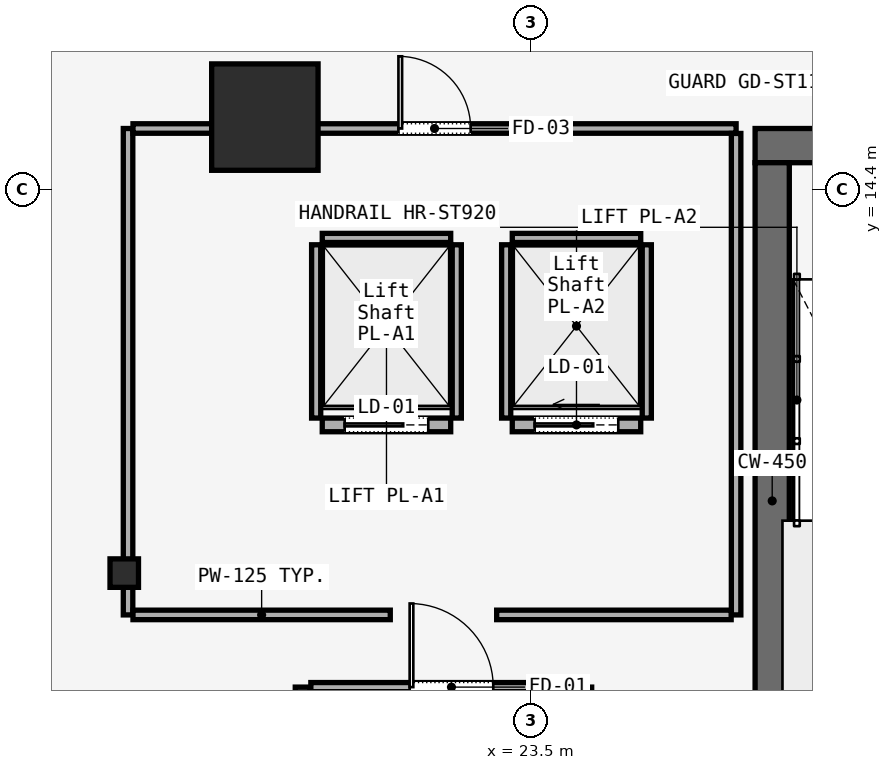
"""IFC4 building model, lengths in metres.
Left out: names, types, materials, properties, quantities, classifications, styles, units other than length and angle.
Written with IfcOpenShell. Run it as: python <this file> out.ifc"""

import sys

from ifc_helpers import new_model, si_unit, direction, frame, frame_2d, origin, origin_2d, place, context, subcontext, project, spatial, rectangle, i_section, extrude, element, fill, save


model = new_model("IFC4")
c1 = context("Model", 3, precision=1e-05, world=origin(), true_north=direction((0.0, 1.0)))
c2 = subcontext(c1, "Body", "Model", "MODEL_VIEW")
j1 = project(units=[si_unit("LENGTHUNIT", "METRE"), si_unit("PLANEANGLEUNIT", "RADIAN")], contexts=[c1])
p1 = place(None, origin())
s1 = spatial("IfcSite", under=j1, at=p1, CompositionType="ELEMENT")
p2 = place(p1, origin())
s2 = spatial("IfcBuilding", under=s1, at=p2, CompositionType="ELEMENT")
p3 = place(p2, frame((0.0, 0.0, -4.5)))
s3 = spatial("IfcBuildingStorey", under=s2, at=p3, CompositionType="ELEMENT", Elevation=-4.5)
p4 = place(p3, frame((26.45, 14.975, 0.0), z_axis=(0.0, 0.0, 1.0), x_axis=(1.0, 0.0, 0.0)))
e1 = element("IfcWall", 1, at=p4, inside=s3, PredefinedType="SOLIDWALL", context=c2, shape_type="SweptSolid", body=[
    extrude(rectangle(XDim=31.1, YDim=0.45, at=frame_2d((15.55, 0.0))), origin(), (0.0, 0.0, 1.0), 4.1),
])
p5 = place(p4, frame((1.65, 0.0, 0.0)))
e2 = element("IfcOpeningElement", 2, at=p5, cuts=e1, PredefinedType="OPENING", context=c2, shape_type="SweptSolid", body=[
    extrude(rectangle(XDim=1.1, YDim=2.2, at=frame_2d((0.55, 1.1))), frame((0.0, 0.225, 0.0), z_axis=(0.0, -1.0, 0.0), x_axis=(1.0, 0.0, 0.0)), (0.0, 0.0, 1.0), 0.45),
])
p6 = place(p4, frame((13.65, 0.0, 0.0)))
e3 = element("IfcOpeningElement", 3, at=p6, cuts=e1, PredefinedType="OPENING", context=c2, shape_type="SweptSolid", body=[
    extrude(rectangle(XDim=1.1, YDim=2.2, at=frame_2d((0.55, 1.1))), frame((0.0, 0.225, 0.0), z_axis=(0.0, -1.0, 0.0), x_axis=(1.0, 0.0, 0.0)), (0.0, 0.0, 1.0), 0.45),
])
p7 = place(p4, frame((25.55, 0.0, 0.0)))
e4 = element("IfcOpeningElement", 4, at=p7, cuts=e1, PredefinedType="OPENING", context=c2, shape_type="SweptSolid", body=[
    extrude(rectangle(XDim=1.1, YDim=2.2, at=frame_2d((0.55, 1.1))), frame((0.0, 0.225, 0.0), z_axis=(0.0, -1.0, 0.0), x_axis=(1.0, 0.0, 0.0)), (0.0, 0.0, 1.0), 0.45),
])
p8 = place(p4, frame((10.7, 0.0, 0.0)))
e5 = element("IfcOpeningElement", 5, at=p8, cuts=e1, PredefinedType="OPENING", context=c2, shape_type="SweptSolid", body=[
    extrude(rectangle(XDim=1.4, YDim=2.2, at=frame_2d((0.7, 1.1))), frame((0.0, 0.225, 0.0), z_axis=(0.0, -1.0, 0.0), x_axis=(1.0, 0.0, 0.0)), (0.0, 0.0, 1.0), 0.45),
])
p9 = place(p4, frame((19.35, 0.0, 0.0)))
e6 = element("IfcOpeningElement", 6, at=p9, cuts=e1, PredefinedType="OPENING", context=c2, shape_type="SweptSolid", body=[
    extrude(rectangle(XDim=1.1, YDim=2.2, at=frame_2d((0.55, 1.1))), frame((0.0, 0.225, 0.0), z_axis=(0.0, -1.0, 0.0), x_axis=(1.0, 0.0, 0.0)), (0.0, 0.0, 1.0), 0.45),
])
p10 = place(p4, frame((21.4, 0.0, 0.0)))
e7 = element("IfcOpeningElement", 7, at=p10, cuts=e1, PredefinedType="OPENING", context=c2, shape_type="SweptSolid", body=[
    extrude(rectangle(XDim=0.9, YDim=2.1, at=frame_2d((0.45, 1.05))), frame((0.0, 0.225, 0.0), z_axis=(0.0, -1.0, 0.0), x_axis=(1.0, 0.0, 0.0)), (0.0, 0.0, 1.0), 0.45),
])
p11 = place(p4, frame((23.35, 0.0, 0.0)))
e8 = element("IfcOpeningElement", 8, at=p11, cuts=e1, PredefinedType="OPENING", context=c2, shape_type="SweptSolid", body=[
    extrude(rectangle(XDim=1.3, YDim=2.3, at=frame_2d((0.65, 1.15))), frame((0.0, 0.225, 0.0), z_axis=(0.0, -1.0, 0.0), x_axis=(1.0, 0.0, 0.0)), (0.0, 0.0, 1.0), 0.45),
])
p12 = place(p3, frame((26.675, 5.85, 0.0), z_axis=(0.0, 0.0, 1.0), x_axis=(0.0, 1.0, 0.0)))
e9 = element("IfcWall", 9, at=p12, inside=s3, PredefinedType="SOLIDWALL", context=c2, shape_type="SweptSolid", body=[
    extrude(rectangle(XDim=8.9, YDim=0.45, at=frame_2d((4.45, 0.0))), origin(), (0.0, 0.0, 1.0), 4.1),
])
p13 = place(p3, frame((20.0, 15.35, 0.0), z_axis=(0.0, 0.0, 1.0), x_axis=(1.0, 0.0, 0.0)))
e10 = element("IfcColumn", 10, at=p13, inside=s3, PredefinedType="COLUMN", context=c2, shape_type="SweptSolid", body=[
    extrude(rectangle(XDim=1.4, YDim=1.4, at=origin_2d()), origin(), (0.0, 0.0, 1.0), 4.1),
])
p14 = place(p3, frame((18.15, 9.35, 0.0), z_axis=(0.0, 0.0, 1.0), x_axis=(1.0, 0.0, 0.0)))
e11 = element("IfcColumn", 11, at=p14, inside=s3, PredefinedType="COLUMN", context=c2, shape_type="SweptSolid", body=[
    extrude(i_section(OverallWidth=0.375, OverallDepth=0.375, WebThickness=0.017, FlangeThickness=0.027, FilletRadius=0.015, at=origin_2d()), origin(), (0.0, 0.0, 1.0), 4.1),
])
for number, where, z_axis, x_axis in (
    (12, (20.5, 7.85, 0.0), (0.0, 0.0, 1.0), (0.0, -1.0, 0.0)),
    (13, (24.2, 7.85, 0.0), (0.0, 0.0, 1.0), (0.0, -1.0, 0.0)),
):
    element("IfcWall", number, at=place(p3, frame(where, z_axis=z_axis, x_axis=x_axis)), inside=s3, PredefinedType="SOLIDWALL", context=c2, shape_type="SweptSolid", body=[
        extrude(rectangle(XDim=6.9, YDim=0.2, at=frame_2d((3.45, 0.0))), origin(), (0.0, 0.0, 1.0), 4.5),
    ])
p15 = place(p3, frame((20.605, 7.85, 0.0), z_axis=(0.0, 0.0, 1.0), x_axis=(1.0, 0.0, 0.0)))
e14 = element("IfcWall", 14, at=p15, inside=s3, PredefinedType="SOLIDWALL", context=c2, shape_type="SweptSolid", body=[
    extrude(rectangle(XDim=3.49, YDim=0.12, at=frame_2d((1.745, 0.0))), origin(), (0.0, 0.0, 1.0), 3.143),
])
p16 = place(p15, frame((1.3, 0.0, 0.0)))
e15 = element("IfcOpeningElement", 15, at=p16, cuts=e14, PredefinedType="OPENING", context=c2, shape_type="SweptSolid", body=[
    extrude(rectangle(XDim=1.1, YDim=2.2, at=frame_2d((0.55, 1.1))), frame((0.0, 0.06, 0.0), z_axis=(0.0, -1.0, 0.0), x_axis=(1.0, 0.0, 0.0)), (0.0, 0.0, 1.0), 0.12),
])
p17 = place(p3, frame((20.755, 11.3, 0.0), z_axis=(0.0, 0.0, 1.0), x_axis=(1.0, 0.0, 0.0)))
e16 = element("IfcWall", 16, at=p17, inside=s3, PredefinedType="SOLIDWALL", context=c2, shape_type="SweptSolid", body=[
    extrude(rectangle(XDim=1.69, YDim=0.18, at=frame_2d((0.845, 0.0))), origin(), (0.0, 0.0, 1.0), 3.143),
])
p18 = place(p17, frame((0.295, 0.0, 0.0)))
e17 = element("IfcOpeningElement", 17, at=p18, cuts=e16, PredefinedType="OPENING", context=c2, shape_type="SweptSolid", body=[
    extrude(rectangle(XDim=1.1, YDim=2.2, at=frame_2d((0.55, 1.1))), frame((0.0, 0.09, 0.0), z_axis=(0.0, -1.0, 0.0), x_axis=(1.0, 0.0, 0.0)), (0.0, 0.0, 1.0), 0.18),
])
p19 = place(p3, frame((20.755, 13.76, 0.0), z_axis=(0.0, 0.0, 1.0), x_axis=(1.0, 0.0, 0.0)))
e18 = element("IfcWall", 18, at=p19, inside=s3, PredefinedType="SOLIDWALL", context=c2, shape_type="SweptSolid", body=[
    extrude(rectangle(XDim=1.69, YDim=0.12, at=frame_2d((0.845, 0.0))), origin(), (0.0, 0.0, 1.0), 3.143),
])
for number, where, z_axis, x_axis in (
    (19, (20.675, 11.39, 0.0), (0.0, 0.0, 1.0), (0.0, 1.0, 0.0)),
    (20, (22.525, 11.39, 0.0), (0.0, 0.0, 1.0), (0.0, 1.0, 0.0)),
):
    element("IfcWall", number, at=place(p3, frame(where, z_axis=z_axis, x_axis=x_axis)), inside=s3, PredefinedType="SOLIDWALL", context=c2, shape_type="SweptSolid", body=[
        extrude(rectangle(XDim=2.28, YDim=0.12, at=frame_2d((1.14, 0.0))), origin(), (0.0, 0.0, 1.0), 3.143),
    ])
p20 = place(p3, frame((23.255, 11.3, 0.0), z_axis=(0.0, 0.0, 1.0), x_axis=(1.0, 0.0, 0.0)))
e21 = element("IfcWall", 21, at=p20, inside=s3, PredefinedType="SOLIDWALL", context=c2, shape_type="SweptSolid", body=[
    extrude(rectangle(XDim=1.69, YDim=0.18, at=frame_2d((0.845, 0.0))), origin(), (0.0, 0.0, 1.0), 3.143),
])
p21 = place(p20, frame((0.295, 0.0, 0.0)))
e22 = element("IfcOpeningElement", 22, at=p21, cuts=e21, PredefinedType="OPENING", context=c2, shape_type="SweptSolid", body=[
    extrude(rectangle(XDim=1.1, YDim=2.2, at=frame_2d((0.55, 1.1))), frame((0.0, 0.09, 0.0), z_axis=(0.0, -1.0, 0.0), x_axis=(1.0, 0.0, 0.0)), (0.0, 0.0, 1.0), 0.18),
])
p22 = place(p3, frame((23.255, 13.76, 0.0), z_axis=(0.0, 0.0, 1.0), x_axis=(1.0, 0.0, 0.0)))
e23 = element("IfcWall", 23, at=p22, inside=s3, PredefinedType="SOLIDWALL", context=c2, shape_type="SweptSolid", body=[
    extrude(rectangle(XDim=1.69, YDim=0.12, at=frame_2d((0.845, 0.0))), origin(), (0.0, 0.0, 1.0), 3.143),
])
for number, where, z_axis, x_axis in (
    (24, (23.175, 11.39, 0.0), (0.0, 0.0, 1.0), (0.0, 1.0, 0.0)),
    (25, (25.025, 11.39, 0.0), (0.0, 0.0, 1.0), (0.0, 1.0, 0.0)),
):
    element("IfcWall", number, at=place(p3, frame(where, z_axis=z_axis, x_axis=x_axis)), inside=s3, PredefinedType="SOLIDWALL", context=c2, shape_type="SweptSolid", body=[
        extrude(rectangle(XDim=2.28, YDim=0.12, at=frame_2d((1.14, 0.0))), origin(), (0.0, 0.0, 1.0), 3.143),
    ])
p23 = place(p3, frame((18.2, 8.8, 0.0), z_axis=(0.0, 0.0, 1.0), x_axis=(0.0, 1.0, 0.0)))
e26 = element("IfcWall", 26, at=p23, inside=s3, PredefinedType="PARTITIONING", context=c2, shape_type="SweptSolid", body=[
    extrude(rectangle(XDim=6.4, YDim=0.125, at=frame_2d((3.2, 0.0))), origin(), (0.0, 0.0, 1.0), 3.143),
])
p24 = place(p3, frame((18.265, 15.2, 0.0), z_axis=(0.0, 0.0, 1.0), x_axis=(1.0, 0.0, 0.0)))
e27 = element("IfcWall", 27, at=p24, inside=s3, PredefinedType="PARTITIONING", context=c2, shape_type="SweptSolid", body=[
    extrude(rectangle(XDim=7.935, YDim=0.125, at=frame_2d((3.968, 0.0))), origin(), (0.0, 0.0, 1.0), 3.143),
])
p25 = place(p24, frame((3.492, 0.0, 0.0)))
e28 = element("IfcOpeningElement", 28, at=p25, cuts=e27, PredefinedType="OPENING", context=c2, shape_type="SweptSolid", body=[
    extrude(rectangle(XDim=0.95, YDim=2.2, at=frame_2d((0.475, 1.1))), frame((0.0, 0.062, 0.0), z_axis=(0.0, -1.0, 0.0), x_axis=(1.0, 0.0, 0.0)), (0.0, 0.0, 1.0), 0.125),
])
p26 = place(p3, frame((26.2, 15.135, 0.0), z_axis=(0.0, 0.0, 1.0), x_axis=(0.0, -1.0, 0.0)))
e29 = element("IfcWall", 29, at=p26, inside=s3, PredefinedType="PARTITIONING", context=c2, shape_type="SweptSolid", body=[
    extrude(rectangle(XDim=6.335, YDim=0.125, at=frame_2d((3.167, 0.0))), origin(), (0.0, 0.0, 1.0), 3.143),
])
p27 = place(p3, frame((26.135, 8.8, 0.0), z_axis=(0.0, 0.0, 1.0), x_axis=(-1.0, 0.0, 0.0)))
e30 = element("IfcWall", 30, at=p27, inside=s3, PredefinedType="PARTITIONING", context=c2, shape_type="SweptSolid", body=[
    extrude(rectangle(XDim=3.085, YDim=0.125, at=frame_2d((1.542, 0.0))), origin(), (0.0, 0.0, 1.0), 3.143),
])
p28 = place(p3, frame((21.65, 8.8, 0.0), z_axis=(0.0, 0.0, 1.0), x_axis=(-1.0, 0.0, 0.0)))
e31 = element("IfcWall", 31, at=p28, inside=s3, PredefinedType="PARTITIONING", context=c2, shape_type="SweptSolid", body=[
    extrude(rectangle(XDim=3.385, YDim=0.125, at=frame_2d((1.692, 0.0))), origin(), (0.0, 0.0, 1.0), 3.143),
])
p29 = place(p16, origin())
e32 = element("IfcDoor", 32, at=p29, inside=s3, OperationType="SINGLE_SWING_RIGHT", PredefinedType="DOOR", context=c2, shape_type="SweptSolid", body=[
    extrude(rectangle(XDim=1.1, YDim=2.2, at=frame_2d((0.55, 1.1))), frame((0.0, 0.025, 0.0), z_axis=(0.0, -1.0, 0.0), x_axis=(1.0, 0.0, 0.0)), (0.0, 0.0, 1.0), 0.05),
])
fill(e15, e32)
p30 = place(p18, origin())
e33 = element("IfcDoor", 33, at=p30, inside=s3, OperationType="SLIDING_TO_LEFT", PredefinedType="DOOR", context=c2, shape_type="SweptSolid", body=[
    extrude(rectangle(XDim=1.1, YDim=2.2, at=frame_2d((0.55, 1.1))), frame((0.0, 0.025, 0.0), z_axis=(0.0, -1.0, 0.0), x_axis=(1.0, 0.0, 0.0)), (0.0, 0.0, 1.0), 0.05),
])
fill(e17, e33)
p31 = place(p21, origin())
e34 = element("IfcDoor", 34, at=p31, inside=s3, OperationType="SLIDING_TO_LEFT", PredefinedType="DOOR", context=c2, shape_type="SweptSolid", body=[
    extrude(rectangle(XDim=1.1, YDim=2.2, at=frame_2d((0.55, 1.1))), frame((0.0, 0.025, 0.0), z_axis=(0.0, -1.0, 0.0), x_axis=(1.0, 0.0, 0.0)), (0.0, 0.0, 1.0), 0.05),
])
fill(e22, e34)
p32 = place(p25, origin())
e35 = element("IfcDoor", 35, at=p32, inside=s3, OperationType="SINGLE_SWING_RIGHT", PredefinedType="DOOR", context=c2, shape_type="SweptSolid", body=[
    extrude(rectangle(XDim=0.95, YDim=2.2, at=frame_2d((0.475, 1.1))), frame((0.0, 0.025, 0.0), z_axis=(0.0, -1.0, 0.0), x_axis=(1.0, 0.0, 0.0)), (0.0, 0.0, 1.0), 0.05),
])
fill(e28, e35)
save(model, sys.argv[1])
